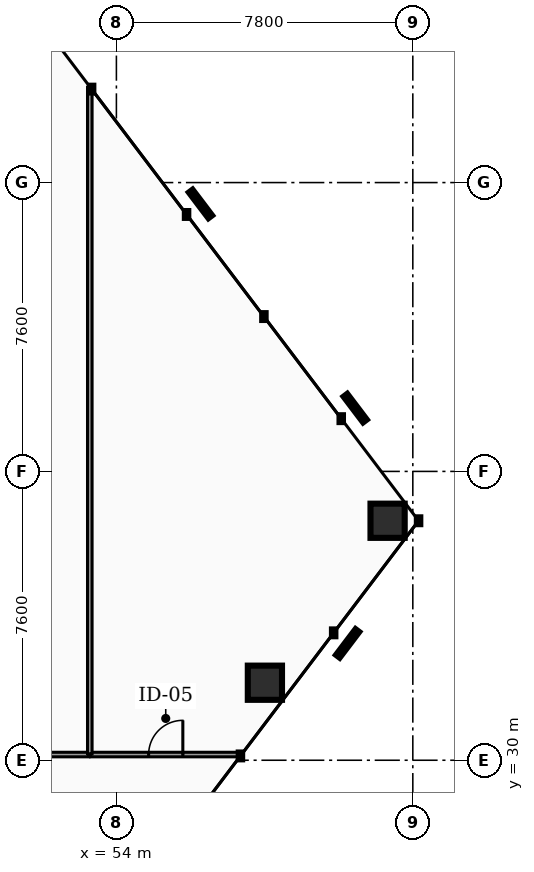
"""IFC4 building model, lengths in metres.
Left out: names, types, materials, properties, quantities, classifications, styles, units other than length and angle.
Written with IfcOpenShell. Run it as: python <this file> out.ifc"""

import sys

from ifc_helpers import new_model, si_unit, direction, frame, frame_2d, origin, origin_2d, place, context, subcontext, project, spatial, rectangle, hollow_rectangle, extrude, element, fill, save


model = new_model("IFC4")
c1 = context("Model", 3, precision=1e-05, world=origin(), true_north=direction((0.0, 1.0)))
c2 = subcontext(c1, "Body", "Model", "MODEL_VIEW")
j1 = project(units=[si_unit("LENGTHUNIT", "METRE"), si_unit("PLANEANGLEUNIT", "RADIAN")], contexts=[c1])
p1 = place(None, origin())
s1 = spatial("IfcSite", under=j1, at=p1, CompositionType="ELEMENT")
p2 = place(p1, origin())
s2 = spatial("IfcBuilding", under=s1, at=p2, CompositionType="ELEMENT")
p3 = place(p2, frame((0.0, 0.0, 72.42)))
s3 = spatial("IfcBuildingStorey", under=s2, at=p3, CompositionType="ELEMENT", Elevation=72.42)
for number, where, z_axis, x_axis in (
    (1, (57.908, 32.04, 0.0), (0.0, 0.0, 1.0), (1.0, 0.0, 0.0)),
    (2, (61.136, 36.302, 0.0), (0.0, 0.0, 1.0), (1.0, 0.0, 0.0)),
):
    element("IfcColumn", number, at=place(p3, frame(where, z_axis=z_axis, x_axis=x_axis)), inside=s3, PredefinedType="COLUMN", context=c2, shape_type="SweptSolid", body=[
        extrude(hollow_rectangle(XDim=0.9, YDim=0.9, WallThickness=0.045, at=origin_2d()), origin(), (0.0, 0.0, 1.0), 3.82),
    ])
p4 = place(p3, frame((53.32, 30.15, 0.0), z_axis=(0.0, 0.0, 1.0), x_axis=(1.0, 0.0, 0.0)))
e3 = element("IfcWall", 3, at=p4, inside=s3, PredefinedType="PARTITIONING", context=c2, shape_type="SweptSolid", body=[
    extrude(rectangle(XDim=3.956, YDim=0.12, at=frame_2d((1.978, 0.0))), origin(), (0.0, 0.0, 1.0), 2.777),
])
p5 = place(p4, frame((1.528, 0.0, 0.0)))
e4 = element("IfcOpeningElement", 4, at=p5, cuts=e3, PredefinedType="OPENING", context=c2, shape_type="SweptSolid", body=[
    extrude(rectangle(XDim=0.9, YDim=2.05, at=frame_2d((0.45, 1.025))), frame((0.0, 0.07, 0.0), z_axis=(0.0, -1.0, 0.0), x_axis=(1.0, 0.0, 0.0)), (0.0, 0.0, 1.0), 0.14),
])
p6 = place(p3, frame((50.45, 30.15, 0.0), z_axis=(0.0, 0.0, 1.0), x_axis=(1.0, 0.0, 0.0)))
e5 = element("IfcWall", 5, at=p6, inside=s3, PredefinedType="PARTITIONING", context=c2, shape_type="SweptSolid", body=[
    extrude(rectangle(XDim=2.83, YDim=0.12, at=frame_2d((1.415, 0.0))), origin(), (0.0, 0.0, 1.0), 2.777),
])
p7 = place(p3, frame((53.3, 30.17, 0.0), z_axis=(0.0, 0.0, 1.0), x_axis=(0.0, 1.0, 0.0)))
e6 = element("IfcWall", 6, at=p7, inside=s3, PredefinedType="PARTITIONING", context=c2, shape_type="SweptSolid", body=[
    extrude(rectangle(XDim=17.537, YDim=0.12, at=frame_2d((8.769, 0.0))), origin(), (0.0, 0.0, 1.0), 2.777),
])
p8 = place(p5, origin())
e7 = element("IfcDoor", 7, at=p8, inside=s3, OperationType="SINGLE_SWING_RIGHT", PredefinedType="DOOR", context=c2, shape_type="SweptSolid", body=[
    extrude(rectangle(XDim=0.9, YDim=2.05, at=frame_2d((0.45, 1.025))), frame((0.0, 0.025, 0.0), z_axis=(0.0, -1.0, 0.0), x_axis=(1.0, 0.0, 0.0)), (0.0, 0.0, 1.0), 0.05),
])
fill(e4, e7)
save(model, sys.argv[1])
